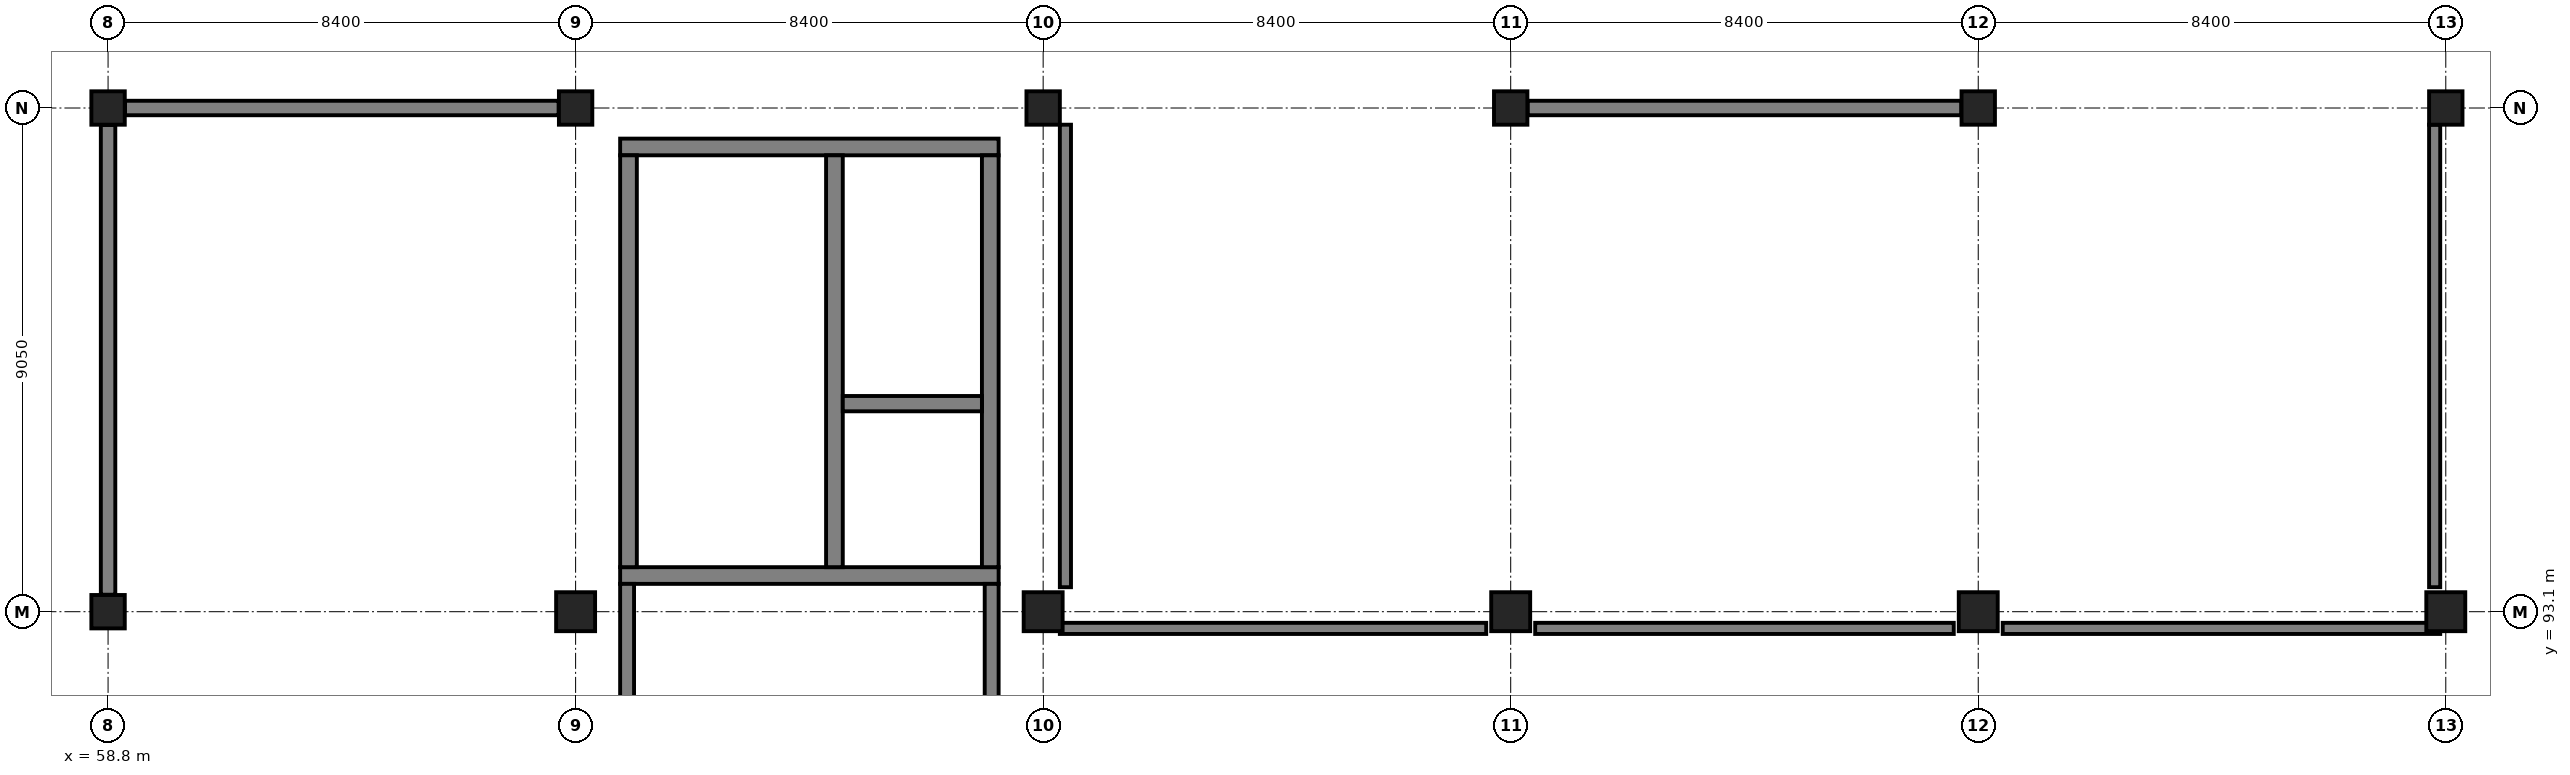
"""IFC4 building model, lengths in metres.
Left out: names, types, materials, properties, quantities, classifications, styles, units other than length and angle.
Written with IfcOpenShell. Run it as: python <this file> out.ifc"""

import sys

from ifc_helpers import new_model, si_unit, direction, frame, frame_2d, origin, origin_2d, place, context, subcontext, project, spatial, rectangle, extrude, element, fill, save


model = new_model("IFC4")
c1 = context("Model", 3, precision=1e-05, world=origin(), true_north=direction((0.0, 1.0)))
c2 = subcontext(c1, "Body", "Model", "MODEL_VIEW")
j1 = project(units=[si_unit("LENGTHUNIT", "METRE"), si_unit("PLANEANGLEUNIT", "RADIAN")], contexts=[c1])
p1 = place(None, origin())
s1 = spatial("IfcSite", under=j1, at=p1, CompositionType="ELEMENT")
p2 = place(p1, origin())
s2 = spatial("IfcBuilding", under=s1, at=p2, CompositionType="ELEMENT")
p3 = place(p2, frame((0.0, 0.0, 10.8)))
s3 = spatial("IfcBuildingStorey", under=s2, at=p3, CompositionType="ELEMENT", Elevation=10.8)
for number, where, z_axis, x_axis in (
    (1, (58.8, 93.1, 0.0), (0.0, 0.0, 1.0), (1.0, 0.0, 0.0)),
    (2, (58.8, 102.15, 0.0), (0.0, 0.0, 1.0), (1.0, 0.0, 0.0)),
):
    element("IfcColumn", number, at=place(p3, frame(where, z_axis=z_axis, x_axis=x_axis)), inside=s3, PredefinedType="COLUMN", context=c2, shape_type="SweptSolid", body=[
        extrude(rectangle(XDim=0.6, YDim=0.6, at=origin_2d()), origin(), (0.0, 0.0, 1.0), 4.8),
    ])
p4 = place(p3, frame((67.2, 93.1, 0.0), z_axis=(0.0, 0.0, 1.0), x_axis=(1.0, 0.0, 0.0)))
e3 = element("IfcColumn", 3, at=p4, inside=s3, PredefinedType="COLUMN", context=c2, shape_type="SweptSolid", body=[
    extrude(rectangle(XDim=0.7, YDim=0.7, at=origin_2d()), origin(), (0.0, 0.0, 1.0), 4.8),
])
p5 = place(p3, frame((67.2, 102.15, 0.0), z_axis=(0.0, 0.0, 1.0), x_axis=(1.0, 0.0, 0.0)))
e4 = element("IfcColumn", 4, at=p5, inside=s3, PredefinedType="COLUMN", context=c2, shape_type="SweptSolid", body=[
    extrude(rectangle(XDim=0.6, YDim=0.6, at=origin_2d()), origin(), (0.0, 0.0, 1.0), 4.8),
])
p6 = place(p3, frame((75.6, 93.1, 0.0), z_axis=(0.0, 0.0, 1.0), x_axis=(1.0, 0.0, 0.0)))
e5 = element("IfcColumn", 5, at=p6, inside=s3, PredefinedType="COLUMN", context=c2, shape_type="SweptSolid", body=[
    extrude(rectangle(XDim=0.7, YDim=0.7, at=origin_2d()), origin(), (0.0, 0.0, 1.0), 4.8),
])
p7 = place(p3, frame((75.6, 102.15, 0.0), z_axis=(0.0, 0.0, 1.0), x_axis=(1.0, 0.0, 0.0)))
e6 = element("IfcColumn", 6, at=p7, inside=s3, PredefinedType="COLUMN", context=c2, shape_type="SweptSolid", body=[
    extrude(rectangle(XDim=0.6, YDim=0.6, at=origin_2d()), origin(), (0.0, 0.0, 1.0), 4.8),
])
p8 = place(p3, frame((84.0, 93.1, 0.0), z_axis=(0.0, 0.0, 1.0), x_axis=(1.0, 0.0, 0.0)))
e7 = element("IfcColumn", 7, at=p8, inside=s3, PredefinedType="COLUMN", context=c2, shape_type="SweptSolid", body=[
    extrude(rectangle(XDim=0.7, YDim=0.7, at=origin_2d()), origin(), (0.0, 0.0, 1.0), 4.8),
])
p9 = place(p3, frame((84.0, 102.15, 0.0), z_axis=(0.0, 0.0, 1.0), x_axis=(1.0, 0.0, 0.0)))
e8 = element("IfcColumn", 8, at=p9, inside=s3, PredefinedType="COLUMN", context=c2, shape_type="SweptSolid", body=[
    extrude(rectangle(XDim=0.6, YDim=0.6, at=origin_2d()), origin(), (0.0, 0.0, 1.0), 4.8),
])
p10 = place(p3, frame((92.4, 93.1, 0.0), z_axis=(0.0, 0.0, 1.0), x_axis=(1.0, 0.0, 0.0)))
e9 = element("IfcColumn", 9, at=p10, inside=s3, PredefinedType="COLUMN", context=c2, shape_type="SweptSolid", body=[
    extrude(rectangle(XDim=0.7, YDim=0.7, at=origin_2d()), origin(), (0.0, 0.0, 1.0), 4.8),
])
p11 = place(p3, frame((92.4, 102.15, 0.0), z_axis=(0.0, 0.0, 1.0), x_axis=(1.0, 0.0, 0.0)))
e10 = element("IfcColumn", 10, at=p11, inside=s3, PredefinedType="COLUMN", context=c2, shape_type="SweptSolid", body=[
    extrude(rectangle(XDim=0.6, YDim=0.6, at=origin_2d()), origin(), (0.0, 0.0, 1.0), 4.8),
])
p12 = place(p3, frame((100.8, 93.1, 0.0), z_axis=(0.0, 0.0, 1.0), x_axis=(1.0, 0.0, 0.0)))
e11 = element("IfcColumn", 11, at=p12, inside=s3, PredefinedType="COLUMN", context=c2, shape_type="SweptSolid", body=[
    extrude(rectangle(XDim=0.7, YDim=0.7, at=origin_2d()), origin(), (0.0, 0.0, 1.0), 4.8),
])
p13 = place(p3, frame((100.8, 102.15, 0.0), z_axis=(0.0, 0.0, 1.0), x_axis=(1.0, 0.0, 0.0)))
e12 = element("IfcColumn", 12, at=p13, inside=s3, PredefinedType="COLUMN", context=c2, shape_type="SweptSolid", body=[
    extrude(rectangle(XDim=0.6, YDim=0.6, at=origin_2d()), origin(), (0.0, 0.0, 1.0), 4.8),
])
p14 = place(p3, frame((92.095, 102.15, 0.0), z_axis=(0.0, 0.0, 1.0), x_axis=(-1.0, 0.0, 0.0)))
e13 = element("IfcWall", 13, at=p14, inside=s3, PredefinedType="STANDARD", context=c2, shape_type="SweptSolid", body=[
    extrude(rectangle(XDim=7.79, YDim=0.26, at=frame_2d((3.895, 0.0))), origin(), (0.0, 0.0, 1.0), 3.63),
])
p15 = place(p14, frame((2.215, 0.0, 0.95)))
e14 = element("IfcOpeningElement", 14, at=p15, cuts=e13, PredefinedType="OPENING", context=c2, shape_type="SweptSolid", body=[
    extrude(rectangle(XDim=3.36, YDim=1.96, at=frame_2d((1.68, 0.98))), frame((0.0, 0.14, 0.0), z_axis=(0.0, -1.0, 0.0), x_axis=(1.0, 0.0, 0.0)), (0.0, 0.0, 1.0), 0.28),
])
p16 = place(p3, frame((66.895, 102.15, 0.0), z_axis=(0.0, 0.0, 1.0), x_axis=(-1.0, 0.0, 0.0)))
e15 = element("IfcWall", 15, at=p16, inside=s3, PredefinedType="STANDARD", context=c2, shape_type="SweptSolid", body=[
    extrude(rectangle(XDim=7.79, YDim=0.26, at=frame_2d((3.895, 0.0))), origin(), (0.0, 0.0, 1.0), 3.63),
])
p17 = place(p16, frame((2.845, 0.0, 0.95)))
e16 = element("IfcOpeningElement", 16, at=p17, cuts=e15, PredefinedType="OPENING", context=c2, shape_type="SweptSolid", body=[
    extrude(rectangle(XDim=2.1, YDim=2.1, at=frame_2d((1.05, 1.05))), frame((0.0, 0.14, 0.0), z_axis=(0.0, -1.0, 0.0), x_axis=(1.0, 0.0, 0.0)), (0.0, 0.0, 1.0), 0.28),
])
p18 = place(p3, frame((58.8, 101.845, 0.0), z_axis=(0.0, 0.0, 1.0), x_axis=(0.0, -1.0, 0.0)))
e17 = element("IfcWall", 17, at=p18, inside=s3, PredefinedType="STANDARD", context=c2, shape_type="SweptSolid", body=[
    extrude(rectangle(XDim=8.44, YDim=0.26, at=frame_2d((4.22, 0.0))), origin(), (0.0, 0.0, 1.0), 3.65),
])
p19 = place(p18, frame((3.42, 0.0, 0.0)))
e18 = element("IfcOpeningElement", 18, at=p19, cuts=e17, PredefinedType="OPENING", context=c2, shape_type="SweptSolid", body=[
    extrude(rectangle(XDim=1.6, YDim=2.25, at=frame_2d((0.8, 1.125))), frame((0.0, 0.14, 0.0), z_axis=(0.0, -1.0, 0.0), x_axis=(1.0, 0.0, 0.0)), (0.0, 0.0, 1.0), 0.28),
])
p20 = place(p3, frame((68.0, 93.75, 0.0), z_axis=(0.0, 0.0, 1.0), x_axis=(1.0, 0.0, 0.0)))
e19 = element("IfcWall", 19, at=p20, inside=s3, PredefinedType="SHEAR", context=c2, shape_type="SweptSolid", body=[
    extrude(rectangle(XDim=6.8, YDim=0.3, at=frame_2d((3.4, 0.0))), origin(), (0.0, 0.0, 1.0), 4.5),
])
p21 = place(p20, frame((1.425, 0.0, 0.0)))
e20 = element("IfcOpeningElement", 20, at=p21, cuts=e19, PredefinedType="OPENING", context=c2, shape_type="SweptSolid", body=[
    extrude(rectangle(XDim=1.15, YDim=2.2, at=frame_2d((0.575, 1.1))), frame((0.0, 0.16, 0.0), z_axis=(0.0, -1.0, 0.0), x_axis=(1.0, 0.0, 0.0)), (0.0, 0.0, 1.0), 0.32),
])
p22 = place(p20, frame((4.5, 0.0, 0.0)))
e21 = element("IfcOpeningElement", 21, at=p22, cuts=e19, PredefinedType="OPENING", context=c2, shape_type="SweptSolid", body=[
    extrude(rectangle(XDim=1.5, YDim=2.3, at=frame_2d((0.75, 1.15))), frame((0.0, 0.16, 0.0), z_axis=(0.0, -1.0, 0.0), x_axis=(1.0, 0.0, 0.0)), (0.0, 0.0, 1.0), 0.32),
])
p23 = place(p3, frame((68.0, 101.45, 0.0), z_axis=(0.0, 0.0, 1.0), x_axis=(1.0, 0.0, 0.0)))
e22 = element("IfcWall", 22, at=p23, inside=s3, PredefinedType="SHEAR", context=c2, shape_type="SweptSolid", body=[
    extrude(rectangle(XDim=6.8, YDim=0.3, at=frame_2d((3.4, 0.0))), origin(), (0.0, 0.0, 1.0), 4.5),
])
for number, where, z_axis, x_axis in (
    (23, (68.15, 93.9, 0.0), (0.0, 0.0, 1.0), (0.0, 1.0, 0.0)),
    (24, (74.65, 93.9, 0.0), (0.0, 0.0, 1.0), (0.0, 1.0, 0.0)),
    (25, (71.85, 93.9, 0.0), (0.0, 0.0, 1.0), (0.0, 1.0, 0.0)),
):
    element("IfcWall", number, at=place(p3, frame(where, z_axis=z_axis, x_axis=x_axis)), inside=s3, PredefinedType="SHEAR", context=c2, shape_type="SweptSolid", body=[
        extrude(rectangle(XDim=7.4, YDim=0.3, at=frame_2d((3.7, 0.0))), origin(), (0.0, 0.0, 1.0), 4.5),
    ])
p24 = place(p3, frame((72.0, 96.838, 0.0), z_axis=(0.0, 0.0, 1.0), x_axis=(1.0, 0.0, 0.0)))
e26 = element("IfcWall", 26, at=p24, inside=s3, PredefinedType="SHEAR", context=c2, shape_type="SweptSolid", body=[
    extrude(rectangle(XDim=2.5, YDim=0.275, at=frame_2d((1.25, 0.0))), origin(), (0.0, 0.0, 1.0), 4.5),
])
for number, where, z_axis, x_axis in (
    (27, (68.125, 90.65, 0.0), (0.0, 0.0, 1.0), (0.0, 1.0, 0.0)),
    (28, (74.675, 90.65, 0.0), (0.0, 0.0, 1.0), (0.0, 1.0, 0.0)),
):
    element("IfcWall", number, at=place(p3, frame(where, z_axis=z_axis, x_axis=x_axis)), inside=s3, PredefinedType="PARTITIONING", context=c2, shape_type="SweptSolid", body=[
        extrude(rectangle(XDim=2.95, YDim=0.25, at=frame_2d((1.475, 0.0))), origin(), (0.0, 0.0, 1.0), 3.73),
    ])
p25 = place(p3, frame((75.9, 92.8, 0.0), z_axis=(0.0, 0.0, 1.0), x_axis=(1.0, 0.0, 0.0)))
e29 = element("IfcWall", 29, at=p25, inside=s3, PredefinedType="PARTITIONING", context=c2, shape_type="SweptSolid", body=[
    extrude(rectangle(XDim=7.66, YDim=0.2, at=frame_2d((3.83, 0.0))), origin(), (0.0, 0.0, 1.0), 3.73),
])
p26 = place(p25, frame((3.14, 0.0, 0.0)))
e30 = element("IfcOpeningElement", 30, at=p26, cuts=e29, PredefinedType="OPENING", context=c2, shape_type="SweptSolid", body=[
    extrude(rectangle(XDim=1.38, YDim=2.3, at=frame_2d((0.69, 1.15))), frame((0.0, 0.11, 0.0), z_axis=(0.0, -1.0, 0.0), x_axis=(1.0, 0.0, 0.0)), (0.0, 0.0, 1.0), 0.22),
])
p27 = place(p3, frame((84.44, 92.8, 0.0), z_axis=(0.0, 0.0, 1.0), x_axis=(1.0, 0.0, 0.0)))
e31 = element("IfcWall", 31, at=p27, inside=s3, PredefinedType="PARTITIONING", context=c2, shape_type="SweptSolid", body=[
    extrude(rectangle(XDim=7.52, YDim=0.2, at=frame_2d((3.76, 0.0))), origin(), (0.0, 0.0, 1.0), 3.73),
])
p28 = place(p3, frame((92.84, 92.8, 0.0), z_axis=(0.0, 0.0, 1.0), x_axis=(1.0, 0.0, 0.0)))
e32 = element("IfcWall", 32, at=p28, inside=s3, PredefinedType="PARTITIONING", context=c2, shape_type="SweptSolid", body=[
    extrude(rectangle(XDim=7.86, YDim=0.2, at=frame_2d((3.93, 0.0))), origin(), (0.0, 0.0, 1.0), 3.73),
])
for number, where, z_axis, x_axis in (
    (33, (100.6, 93.54, 0.0), (0.0, 0.0, 1.0), (0.0, 1.0, 0.0)),
    (34, (76.0, 93.54, 0.0), (0.0, 0.0, 1.0), (0.0, 1.0, 0.0)),
):
    element("IfcWall", number, at=place(p3, frame(where, z_axis=z_axis, x_axis=x_axis)), inside=s3, PredefinedType="PARTITIONING", context=c2, shape_type="SweptSolid", body=[
        extrude(rectangle(XDim=8.31, YDim=0.2, at=frame_2d((4.155, 0.0))), origin(), (0.0, 0.0, 1.0), 3.63),
    ])
p29 = place(p15, origin())
e35 = element("IfcWindow", 35, at=p29, inside=s3, PartitioningType="SINGLE_PANEL", PredefinedType="WINDOW", context=c2, shape_type="SweptSolid", body=[
    extrude(rectangle(XDim=3.36, YDim=1.96, at=frame_2d((1.68, 0.98))), frame((0.0, 0.03, 0.0), z_axis=(0.0, -1.0, 0.0), x_axis=(1.0, 0.0, 0.0)), (0.0, 0.0, 1.0), 0.06),
])
fill(e14, e35)
p30 = place(p17, origin())
e36 = element("IfcWindow", 36, at=p30, inside=s3, PartitioningType="SINGLE_PANEL", PredefinedType="WINDOW", context=c2, shape_type="SweptSolid", body=[
    extrude(rectangle(XDim=2.1, YDim=2.1, at=frame_2d((1.05, 1.05))), frame((0.0, 0.03, 0.0), z_axis=(0.0, -1.0, 0.0), x_axis=(1.0, 0.0, 0.0)), (0.0, 0.0, 1.0), 0.06),
])
fill(e16, e36)
p31 = place(p19, frame((1.6, 0.0, 0.0), z_axis=(0.0, 0.0, 1.0), x_axis=(-1.0, 0.0, 0.0)))
e37 = element("IfcDoor", 37, at=p31, inside=s3, OperationType="DOUBLE_DOOR_SINGLE_SWING", PredefinedType="DOOR", context=c2, shape_type="SweptSolid", body=[
    extrude(rectangle(XDim=1.6, YDim=2.25, at=frame_2d((0.8, 1.125))), frame((0.0, 0.025, 0.0), z_axis=(0.0, -1.0, 0.0), x_axis=(1.0, 0.0, 0.0)), (0.0, 0.0, 1.0), 0.05),
])
fill(e18, e37)
p32 = place(p21, origin())
e38 = element("IfcDoor", 38, at=p32, inside=s3, OperationType="SINGLE_SWING_RIGHT", PredefinedType="DOOR", context=c2, shape_type="SweptSolid", body=[
    extrude(rectangle(XDim=1.15, YDim=2.2, at=frame_2d((0.575, 1.1))), frame((0.0, 0.025, 0.0), z_axis=(0.0, -1.0, 0.0), x_axis=(1.0, 0.0, 0.0)), (0.0, 0.0, 1.0), 0.05),
])
fill(e20, e38)
p33 = place(p22, origin())
e39 = element("IfcDoor", 39, at=p33, inside=s3, OperationType="DOUBLE_DOOR_SLIDING", PredefinedType="DOOR", context=c2, shape_type="SweptSolid", body=[
    extrude(rectangle(XDim=1.5, YDim=2.3, at=frame_2d((0.75, 1.15))), frame((0.0, 0.025, 0.0), z_axis=(0.0, -1.0, 0.0), x_axis=(1.0, 0.0, 0.0)), (0.0, 0.0, 1.0), 0.05),
])
fill(e21, e39)
p34 = place(p26, origin())
e40 = element("IfcDoor", 40, at=p34, inside=s3, OperationType="SINGLE_SWING_LEFT", PredefinedType="DOOR", context=c2, shape_type="SweptSolid", body=[
    extrude(rectangle(XDim=1.38, YDim=2.3, at=frame_2d((0.69, 1.15))), frame((0.0, 0.025, 0.0), z_axis=(0.0, -1.0, 0.0), x_axis=(1.0, 0.0, 0.0)), (0.0, 0.0, 1.0), 0.05),
])
fill(e30, e40)
save(model, sys.argv[1])
